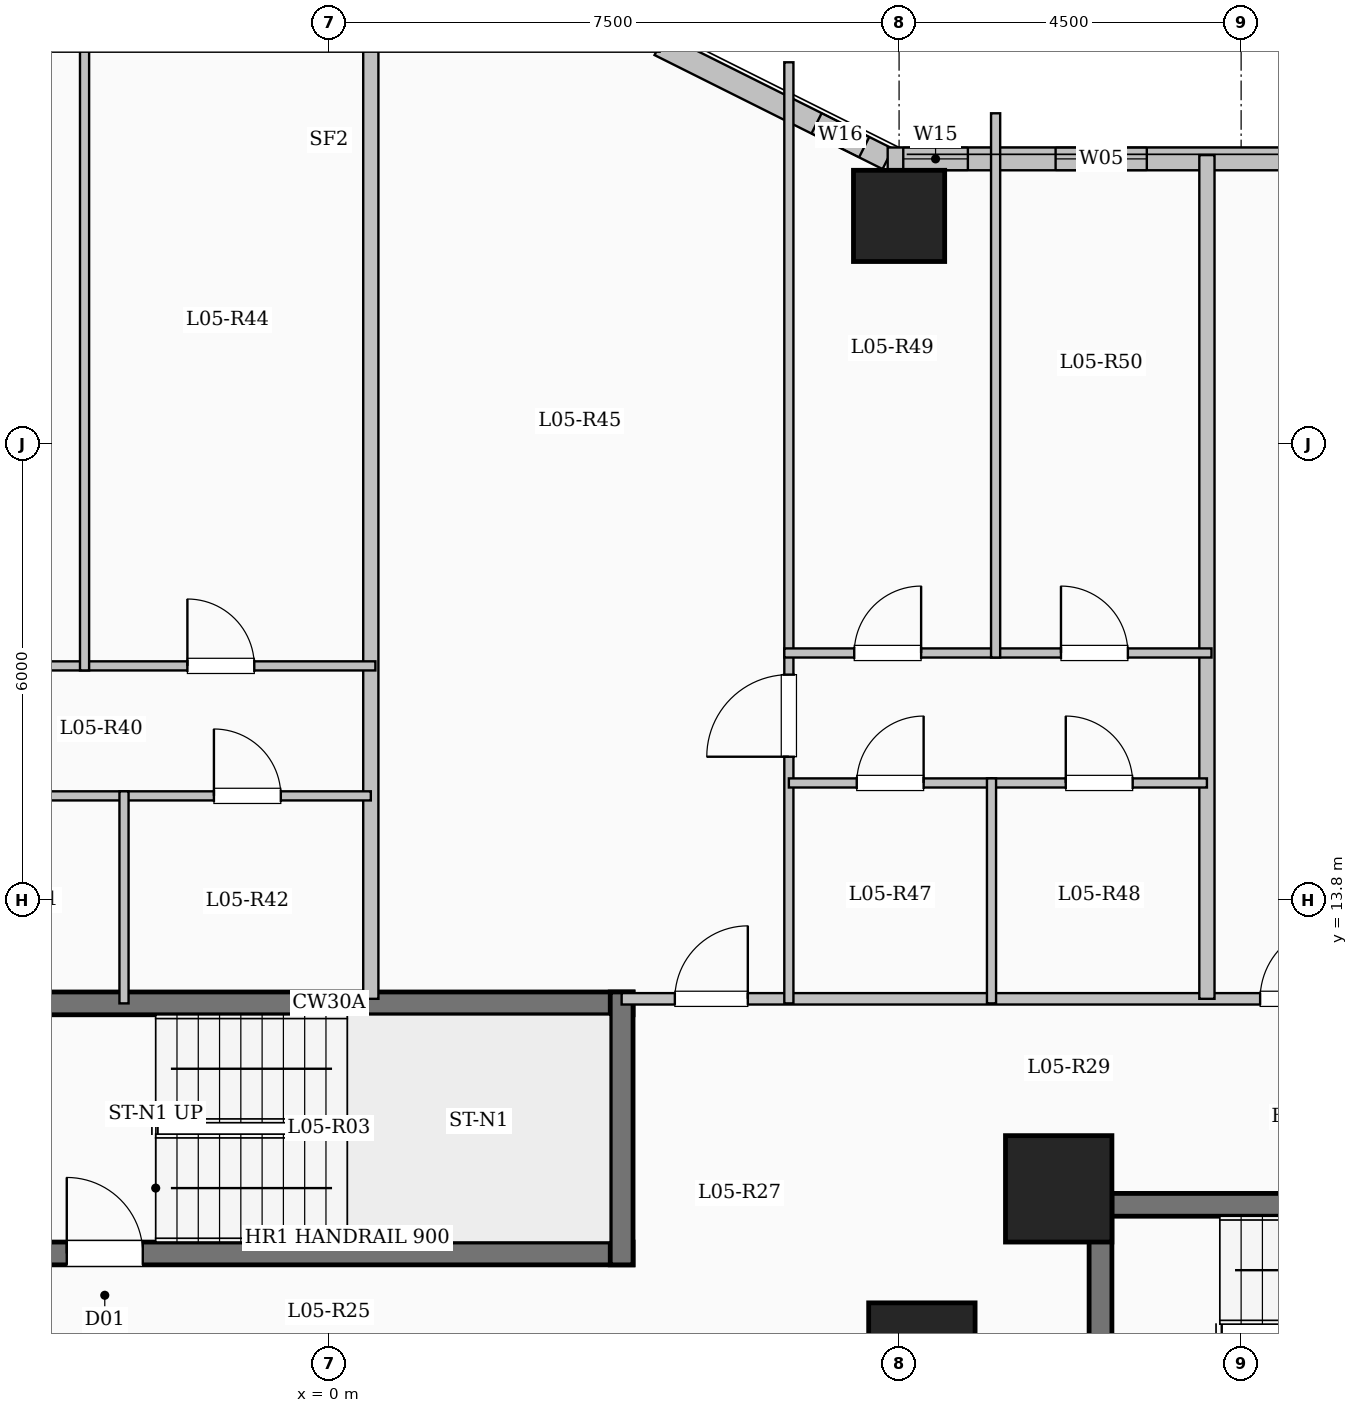
"""IFC4 building model, lengths in metres.
Left out: names, types, materials, properties, quantities, classifications, styles, units other than length and angle.
Written with IfcOpenShell. Run it as: python <this file> out.ifc"""

import sys

from ifc_helpers import new_model, si_unit, direction, frame, frame_2d, origin, origin_2d, place, context, subcontext, project, spatial, rectangle, extrude, element, fill, save


model = new_model("IFC4")
c1 = context("Model", 3, precision=1e-05, world=origin(), true_north=direction((0.0, 1.0)))
c2 = subcontext(c1, "Body", "Model", "MODEL_VIEW")
j1 = project(units=[si_unit("LENGTHUNIT", "METRE"), si_unit("PLANEANGLEUNIT", "RADIAN")], contexts=[c1])
p1 = place(None, origin())
s1 = spatial("IfcSite", under=j1, at=p1, CompositionType="ELEMENT")
p2 = place(p1, origin())
s2 = spatial("IfcBuilding", under=s1, at=p2, CompositionType="ELEMENT")
p3 = place(p2, frame((0.0, 0.0, 24.0)))
s3 = spatial("IfcBuildingStorey", under=s2, at=p3, CompositionType="ELEMENT", Elevation=24.0)
for number, where, z_axis, x_axis in (
    (1, (7.8, 7.8, 0.0), (0.0, 0.0, 1.0), (1.0, 0.0, 0.0)),
    (2, (9.6, 10.0, 0.0), (0.0, 0.0, 1.0), (1.0, 0.0, 0.0)),
):
    element("IfcColumn", number, at=place(p3, frame(where, z_axis=z_axis, x_axis=x_axis)), inside=s3, PredefinedType="COLUMN", context=c2, shape_type="SweptSolid", body=[
        extrude(rectangle(XDim=1.4, YDim=1.4, at=origin_2d()), origin(), (0.0, 0.0, 1.0), 3.35),
    ])
p4 = place(p3, frame((7.5, 22.8, 0.0), z_axis=(0.0, 0.0, 1.0), x_axis=(1.0, 0.0, 0.0)))
e3 = element("IfcColumn", 3, at=p4, inside=s3, PredefinedType="COLUMN", context=c2, shape_type="SweptSolid", body=[
    extrude(rectangle(XDim=1.2, YDim=1.2, at=origin_2d()), origin(), (0.0, 0.0, 1.0), 3.35),
])
p5 = place(p3, frame((4.35, 25.05, 0.0), z_axis=(0.0, 0.0, 1.0), x_axis=(0.894427191, -0.4472135955, 0.0)))
e4 = element("IfcWall", 4, at=p5, inside=s3, PredefinedType="SOLIDWALL", context=c2, shape_type="SweptSolid", body=[
    extrude(rectangle(XDim=3.354, YDim=0.3, at=frame_2d((1.677, 0.0))), origin(), (0.0, 0.0, 1.0), 3.1),
])
p6 = place(p5, frame((2.308, 0.0, 0.95)))
e5 = element("IfcOpeningElement", 5, at=p6, cuts=e4, PredefinedType="OPENING", context=c2, shape_type="SweptSolid", body=[
    extrude(rectangle(XDim=0.7, YDim=1.5, at=frame_2d((0.35, 0.75))), frame((0.0, 0.16, 0.0), z_axis=(0.0, -1.0, 0.0), x_axis=(1.0, 0.0, 0.0)), (0.0, 0.0, 1.0), 0.32),
])
p7 = place(p3, frame((7.35, 23.55, 0.0), z_axis=(0.0, 0.0, 1.0), x_axis=(1.0, 0.0, 0.0)))
e6 = element("IfcWall", 6, at=p7, inside=s3, PredefinedType="SOLIDWALL", context=c2, shape_type="SweptSolid", body=[
    extrude(rectangle(XDim=15.3, YDim=0.3, at=frame_2d((7.65, 0.0))), origin(), (0.0, 0.0, 1.0), 3.1),
])
p8 = place(p7, frame((0.205, 0.0, 0.95)))
e7 = element("IfcOpeningElement", 7, at=p8, cuts=e6, PredefinedType="OPENING", context=c2, shape_type="SweptSolid", body=[
    extrude(rectangle(XDim=0.85, YDim=1.5, at=frame_2d((0.425, 0.75))), frame((0.0, 0.16, 0.0), z_axis=(0.0, -1.0, 0.0), x_axis=(1.0, 0.0, 0.0)), (0.0, 0.0, 1.0), 0.32),
])
p9 = place(p7, frame((2.209, 0.0, 0.95)))
e8 = element("IfcOpeningElement", 8, at=p9, cuts=e6, PredefinedType="OPENING", context=c2, shape_type="SweptSolid", body=[
    extrude(rectangle(XDim=1.2, YDim=1.5, at=frame_2d((0.6, 0.75))), frame((0.0, 0.16, 0.0), z_axis=(0.0, -1.0, 0.0), x_axis=(1.0, 0.0, 0.0)), (0.0, 0.0, 1.0), 0.32),
])
p10 = place(p7, frame((5.196, 0.0, 0.9)))
e9 = element("IfcOpeningElement", 9, at=p10, cuts=e6, PredefinedType="OPENING", context=c2, shape_type="SweptSolid", body=[
    extrude(rectangle(XDim=2.4, YDim=1.8, at=frame_2d((1.2, 0.9))), frame((0.0, 0.16, 0.0), z_axis=(0.0, -1.0, 0.0), x_axis=(1.0, 0.0, 0.0)), (0.0, 0.0, 1.0), 0.32),
])
p11 = place(p7, frame((9.483, 0.0, 0.9)))
e10 = element("IfcOpeningElement", 10, at=p11, cuts=e6, PredefinedType="OPENING", context=c2, shape_type="SweptSolid", body=[
    extrude(rectangle(XDim=1.5, YDim=1.65, at=frame_2d((0.75, 0.825))), frame((0.0, 0.16, 0.0), z_axis=(0.0, -1.0, 0.0), x_axis=(1.0, 0.0, 0.0)), (0.0, 0.0, 1.0), 0.32),
])
p12 = place(p7, frame((12.644, 0.0, 0.9)))
e11 = element("IfcOpeningElement", 11, at=p12, cuts=e6, PredefinedType="OPENING", context=c2, shape_type="SweptSolid", body=[
    extrude(rectangle(XDim=1.8, YDim=1.65, at=frame_2d((0.9, 0.825))), frame((0.0, 0.16, 0.0), z_axis=(0.0, -1.0, 0.0), x_axis=(1.0, 0.0, 0.0)), (0.0, 0.0, 1.0), 0.32),
])
p13 = place(p3, frame((10.0, 9.79, 0.0), z_axis=(0.0, 0.0, 1.0), x_axis=(1.0, 0.0, 0.0)))
e12 = element("IfcWall", 12, at=p13, inside=s3, PredefinedType="SHEAR", context=c2, shape_type="SweptSolid", body=[
    extrude(rectangle(XDim=8.0, YDim=0.3, at=frame_2d((4.0, 0.0))), origin(), (0.0, 0.0, 1.0), 3.35),
])
p14 = place(p3, frame((10.15, 6.35, 0.0), z_axis=(0.0, 0.0, 1.0), x_axis=(0.0, 1.0, 0.0)))
e13 = element("IfcWall", 13, at=p14, inside=s3, PredefinedType="SHEAR", context=c2, shape_type="SweptSolid", body=[
    extrude(rectangle(XDim=3.59, YDim=0.3, at=frame_2d((1.795, 0.0))), origin(), (0.0, 0.0, 1.0), 3.35),
])
p15 = place(p3, frame((-4.0, 12.44, 0.0), z_axis=(0.0, 0.0, 1.0), x_axis=(1.0, 0.0, 0.0)))
e14 = element("IfcWall", 14, at=p15, inside=s3, PredefinedType="SHEAR", context=c2, shape_type="SweptSolid", body=[
    extrude(rectangle(XDim=8.0, YDim=0.3, at=frame_2d((4.0, 0.0))), origin(), (0.0, 0.0, 1.0), 3.35),
])
p16 = place(p3, frame((-4.0, 9.15, 0.0), z_axis=(0.0, 0.0, 1.0), x_axis=(1.0, 0.0, 0.0)))
e15 = element("IfcWall", 15, at=p16, inside=s3, PredefinedType="SHEAR", context=c2, shape_type="SweptSolid", body=[
    extrude(rectangle(XDim=8.0, YDim=0.3, at=frame_2d((4.0, 0.0))), origin(), (0.0, 0.0, 1.0), 3.35),
])
p17 = place(p16, frame((0.55, 0.0, 0.0)))
e16 = element("IfcOpeningElement", 16, at=p17, cuts=e15, PredefinedType="OPENING", context=c2, shape_type="SweptSolid", body=[
    extrude(rectangle(XDim=1.0, YDim=2.15, at=frame_2d((0.5, 1.075))), frame((0.0, 0.16, 0.0), z_axis=(0.0, -1.0, 0.0), x_axis=(1.0, 0.0, 0.0)), (0.0, 0.0, 1.0), 0.32),
])
p18 = place(p3, frame((3.85, 9.0, 0.0), z_axis=(0.0, 0.0, 1.0), x_axis=(0.0, 1.0, 0.0)))
e17 = element("IfcWall", 17, at=p18, inside=s3, PredefinedType="SHEAR", context=c2, shape_type="SweptSolid", body=[
    extrude(rectangle(XDim=3.59, YDim=0.3, at=frame_2d((1.795, 0.0))), origin(), (0.0, 0.0, 1.0), 3.35),
])
p19 = place(p3, frame((3.85, 12.5, 0.0), z_axis=(0.0, 0.0, 1.0), x_axis=(1.0, 0.0, 0.0)))
e18 = element("IfcWall", 18, at=p19, inside=s3, PredefinedType="PARTITIONING", context=c2, shape_type="SweptSolid", body=[
    extrude(rectangle(XDim=18.7, YDim=0.15, at=frame_2d((9.35, 0.0))), origin(), (0.0, 0.0, 1.0), 3.1),
])
p20 = place(p19, frame((0.7, 0.0, 0.0)))
e19 = element("IfcOpeningElement", 19, at=p20, cuts=e18, PredefinedType="OPENING", context=c2, shape_type="SweptSolid", body=[
    extrude(rectangle(XDim=0.96, YDim=2.15, at=frame_2d((0.48, 1.075))), frame((0.0, 0.085, 0.0), z_axis=(0.0, -1.0, 0.0), x_axis=(1.0, 0.0, 0.0)), (0.0, 0.0, 1.0), 0.17),
])
p21 = place(p19, frame((8.4, 0.0, 0.0)))
e20 = element("IfcOpeningElement", 20, at=p21, cuts=e18, PredefinedType="OPENING", context=c2, shape_type="SweptSolid", body=[
    extrude(rectangle(XDim=0.96, YDim=2.15, at=frame_2d((0.48, 1.075))), frame((0.0, 0.085, 0.0), z_axis=(0.0, -1.0, 0.0), x_axis=(1.0, 0.0, 0.0)), (0.0, 0.0, 1.0), 0.17),
])
p22 = place(p3, frame((0.55, 12.5, 0.0), z_axis=(0.0, 0.0, 1.0), x_axis=(0.0, 1.0, 0.0)))
e21 = element("IfcWall", 21, at=p22, inside=s3, PredefinedType="SOLIDWALL", context=c2, shape_type="SweptSolid", body=[
    extrude(rectangle(XDim=12.58, YDim=0.2, at=frame_2d((6.29, 0.0))), origin(), (0.0, 0.0, 1.0), 3.1),
])
p23 = place(p3, frame((-6.922, 15.17, 0.0), z_axis=(0.0, 0.0, 1.0), x_axis=(1.0, 0.0, 0.0)))
e22 = element("IfcWall", 22, at=p23, inside=s3, PredefinedType="PARTITIONING", context=c2, shape_type="SweptSolid", body=[
    extrude(rectangle(XDim=4.225, YDim=0.12, at=frame_2d((2.113, 0.0))), origin(), (0.0, 0.0, 1.0), 3.1),
])
p24 = place(p23, frame((1.672, 0.0, 0.0)))
e23 = element("IfcOpeningElement", 23, at=p24, cuts=e22, PredefinedType="OPENING", context=c2, shape_type="SweptSolid", body=[
    extrude(rectangle(XDim=0.88, YDim=2.1, at=frame_2d((0.44, 1.05))), frame((0.0, 0.07, 0.0), z_axis=(0.0, -1.0, 0.0), x_axis=(1.0, 0.0, 0.0)), (0.0, 0.0, 1.0), 0.14),
])
p25 = place(p3, frame((-2.697, 15.17, 0.0), z_axis=(0.0, 0.0, 1.0), x_axis=(1.0, 0.0, 0.0)))
e24 = element("IfcWall", 24, at=p25, inside=s3, PredefinedType="PARTITIONING", context=c2, shape_type="SweptSolid", body=[
    extrude(rectangle(XDim=3.247, YDim=0.12, at=frame_2d((1.624, 0.0))), origin(), (0.0, 0.0, 1.0), 3.1),
])
p26 = place(p25, frame((1.183, 0.0, 0.0)))
e25 = element("IfcOpeningElement", 25, at=p26, cuts=e24, PredefinedType="OPENING", context=c2, shape_type="SweptSolid", body=[
    extrude(rectangle(XDim=0.88, YDim=2.1, at=frame_2d((0.44, 1.05))), frame((0.0, 0.07, 0.0), z_axis=(0.0, -1.0, 0.0), x_axis=(1.0, 0.0, 0.0)), (0.0, 0.0, 1.0), 0.14),
])
p27 = place(p3, frame((-6.982, 16.88, 0.0), z_axis=(0.0, 0.0, 1.0), x_axis=(1.0, 0.0, 0.0)))
e26 = element("IfcWall", 26, at=p27, inside=s3, PredefinedType="PARTITIONING", context=c2, shape_type="SweptSolid", body=[
    extrude(rectangle(XDim=7.592, YDim=0.12, at=frame_2d((3.796, 0.0))), origin(), (0.0, 0.0, 1.0), 3.1),
])
p28 = place(p27, frame((1.413, 0.0, 0.0)))
e27 = element("IfcOpeningElement", 27, at=p28, cuts=e26, PredefinedType="OPENING", context=c2, shape_type="SweptSolid", body=[
    extrude(rectangle(XDim=0.88, YDim=2.1, at=frame_2d((0.44, 1.05))), frame((0.0, 0.07, 0.0), z_axis=(0.0, -1.0, 0.0), x_axis=(1.0, 0.0, 0.0)), (0.0, 0.0, 1.0), 0.14),
])
p29 = place(p27, frame((5.119, 0.0, 0.0)))
e28 = element("IfcOpeningElement", 28, at=p29, cuts=e26, PredefinedType="OPENING", context=c2, shape_type="SweptSolid", body=[
    extrude(rectangle(XDim=0.88, YDim=2.1, at=frame_2d((0.44, 1.05))), frame((0.0, 0.07, 0.0), z_axis=(0.0, -1.0, 0.0), x_axis=(1.0, 0.0, 0.0)), (0.0, 0.0, 1.0), 0.14),
])
p30 = place(p3, frame((-2.697, 12.44, 0.0), z_axis=(0.0, 0.0, 1.0), x_axis=(0.0, 1.0, 0.0)))
e29 = element("IfcWall", 29, at=p30, inside=s3, PredefinedType="PARTITIONING", context=c2, shape_type="SweptSolid", body=[
    extrude(rectangle(XDim=2.79, YDim=0.12, at=frame_2d((1.395, 0.0))), origin(), (0.0, 0.0, 1.0), 3.1),
])
p31 = place(p3, frame((-3.216, 16.82, 0.0), z_axis=(0.0, 0.0, 1.0), x_axis=(0.0, 1.0, 0.0)))
e30 = element("IfcWall", 30, at=p31, inside=s3, PredefinedType="PARTITIONING", context=c2, shape_type="SweptSolid", body=[
    extrude(rectangle(XDim=8.26, YDim=0.12, at=frame_2d((4.13, 0.0))), origin(), (0.0, 0.0, 1.0), 3.1),
])
p32 = place(p3, frame((11.55, 12.5, 0.0), z_axis=(0.0, 0.0, 1.0), x_axis=(0.0, 1.0, 0.0)))
e31 = element("IfcWall", 31, at=p32, inside=s3, PredefinedType="SOLIDWALL", context=c2, shape_type="SweptSolid", body=[
    extrude(rectangle(XDim=11.1, YDim=0.2, at=frame_2d((5.55, 0.0))), origin(), (0.0, 0.0, 1.0), 3.1),
])
p33 = place(p3, frame((6.05, 12.44, 0.0), z_axis=(0.0, 0.0, 1.0), x_axis=(0.0, 1.0, 0.0)))
e32 = element("IfcWall", 32, at=p33, inside=s3, PredefinedType="PARTITIONING", context=c2, shape_type="SweptSolid", body=[
    extrude(rectangle(XDim=12.381, YDim=0.12, at=frame_2d((6.19, 0.0))), origin(), (0.0, 0.0, 1.0), 3.1),
])
p34 = place(p33, frame((3.245, 0.0, 0.0)))
e33 = element("IfcOpeningElement", 33, at=p34, cuts=e32, PredefinedType="OPENING", context=c2, shape_type="SweptSolid", body=[
    extrude(rectangle(XDim=1.08, YDim=2.15, at=frame_2d((0.54, 1.075))), frame((0.0, 0.07, 0.0), z_axis=(0.0, -1.0, 0.0), x_axis=(1.0, 0.0, 0.0)), (0.0, 0.0, 1.0), 0.14),
])
p35 = place(p3, frame((6.05, 15.34, 0.0), z_axis=(0.0, 0.0, 1.0), x_axis=(1.0, 0.0, 0.0)))
e34 = element("IfcWall", 34, at=p35, inside=s3, PredefinedType="PARTITIONING", context=c2, shape_type="SweptSolid", body=[
    extrude(rectangle(XDim=2.666, YDim=0.12, at=frame_2d((1.333, 0.0))), origin(), (0.0, 0.0, 1.0), 3.1),
])
p36 = place(p35, frame((0.893, 0.0, 0.0)))
e35 = element("IfcOpeningElement", 35, at=p36, cuts=e34, PredefinedType="OPENING", context=c2, shape_type="SweptSolid", body=[
    extrude(rectangle(XDim=0.88, YDim=2.1, at=frame_2d((0.44, 1.05))), frame((0.0, 0.07, 0.0), z_axis=(0.0, -1.0, 0.0), x_axis=(1.0, 0.0, 0.0)), (0.0, 0.0, 1.0), 0.14),
])
p37 = place(p3, frame((8.716, 15.34, 0.0), z_axis=(0.0, 0.0, 1.0), x_axis=(1.0, 0.0, 0.0)))
e36 = element("IfcWall", 36, at=p37, inside=s3, PredefinedType="PARTITIONING", context=c2, shape_type="SweptSolid", body=[
    extrude(rectangle(XDim=2.834, YDim=0.12, at=frame_2d((1.417, 0.0))), origin(), (0.0, 0.0, 1.0), 3.1),
])
p38 = place(p37, frame((0.977, 0.0, 0.0)))
e37 = element("IfcOpeningElement", 37, at=p38, cuts=e36, PredefinedType="OPENING", context=c2, shape_type="SweptSolid", body=[
    extrude(rectangle(XDim=0.88, YDim=2.1, at=frame_2d((0.44, 1.05))), frame((0.0, 0.07, 0.0), z_axis=(0.0, -1.0, 0.0), x_axis=(1.0, 0.0, 0.0)), (0.0, 0.0, 1.0), 0.14),
])
p39 = place(p3, frame((5.99, 17.05, 0.0), z_axis=(0.0, 0.0, 1.0), x_axis=(1.0, 0.0, 0.0)))
e38 = element("IfcWall", 38, at=p39, inside=s3, PredefinedType="PARTITIONING", context=c2, shape_type="SweptSolid", body=[
    extrude(rectangle(XDim=5.62, YDim=0.12, at=frame_2d((2.81, 0.0))), origin(), (0.0, 0.0, 1.0), 3.1),
])
p40 = place(p39, frame((0.92, 0.0, 0.0)))
e39 = element("IfcOpeningElement", 39, at=p40, cuts=e38, PredefinedType="OPENING", context=c2, shape_type="SweptSolid", body=[
    extrude(rectangle(XDim=0.88, YDim=2.1, at=frame_2d((0.44, 1.05))), frame((0.0, 0.07, 0.0), z_axis=(0.0, -1.0, 0.0), x_axis=(1.0, 0.0, 0.0)), (0.0, 0.0, 1.0), 0.14),
])
p41 = place(p39, frame((3.64, 0.0, 0.0)))
e40 = element("IfcOpeningElement", 40, at=p41, cuts=e38, PredefinedType="OPENING", context=c2, shape_type="SweptSolid", body=[
    extrude(rectangle(XDim=0.88, YDim=2.1, at=frame_2d((0.44, 1.05))), frame((0.0, 0.07, 0.0), z_axis=(0.0, -1.0, 0.0), x_axis=(1.0, 0.0, 0.0)), (0.0, 0.0, 1.0), 0.14),
])
p42 = place(p3, frame((8.716, 12.44, 0.0), z_axis=(0.0, 0.0, 1.0), x_axis=(0.0, 1.0, 0.0)))
e41 = element("IfcWall", 41, at=p42, inside=s3, PredefinedType="PARTITIONING", context=c2, shape_type="SweptSolid", body=[
    extrude(rectangle(XDim=2.96, YDim=0.12, at=frame_2d((1.48, 0.0))), origin(), (0.0, 0.0, 1.0), 3.1),
])
p43 = place(p3, frame((8.77, 16.99, 0.0), z_axis=(0.0, 0.0, 1.0), x_axis=(0.0, 1.0, 0.0)))
e42 = element("IfcWall", 42, at=p43, inside=s3, PredefinedType="PARTITIONING", context=c2, shape_type="SweptSolid", body=[
    extrude(rectangle(XDim=7.16, YDim=0.12, at=frame_2d((3.58, 0.0))), origin(), (0.0, 0.0, 1.0), 3.1),
])
p44 = place(p6, origin())
e43 = element("IfcWindow", 43, at=p44, inside=s3, PartitioningType="SINGLE_PANEL", PredefinedType="WINDOW", context=c2, shape_type="SweptSolid", body=[
    extrude(rectangle(XDim=0.7, YDim=1.5, at=frame_2d((0.35, 0.75))), frame((0.0, 0.03, 0.0), z_axis=(0.0, -1.0, 0.0), x_axis=(1.0, 0.0, 0.0)), (0.0, 0.0, 1.0), 0.06),
])
fill(e5, e43)
p45 = place(p8, origin())
e44 = element("IfcWindow", 44, at=p45, inside=s3, PartitioningType="SINGLE_PANEL", PredefinedType="WINDOW", context=c2, shape_type="SweptSolid", body=[
    extrude(rectangle(XDim=0.85, YDim=1.5, at=frame_2d((0.425, 0.75))), frame((0.0, 0.03, 0.0), z_axis=(0.0, -1.0, 0.0), x_axis=(1.0, 0.0, 0.0)), (0.0, 0.0, 1.0), 0.06),
])
fill(e7, e44)
p46 = place(p9, origin())
e45 = element("IfcWindow", 45, at=p46, inside=s3, PartitioningType="SINGLE_PANEL", PredefinedType="WINDOW", context=c2, shape_type="SweptSolid", body=[
    extrude(rectangle(XDim=1.2, YDim=1.5, at=frame_2d((0.6, 0.75))), frame((0.0, 0.03, 0.0), z_axis=(0.0, -1.0, 0.0), x_axis=(1.0, 0.0, 0.0)), (0.0, 0.0, 1.0), 0.06),
])
fill(e8, e45)
p47 = place(p17, origin())
e46 = element("IfcDoor", 46, at=p47, inside=s3, OperationType="SINGLE_SWING_LEFT", PredefinedType="DOOR", context=c2, shape_type="SweptSolid", body=[
    extrude(rectangle(XDim=1.0, YDim=2.15, at=frame_2d((0.5, 1.075))), frame((0.0, 0.025, 0.0), z_axis=(0.0, -1.0, 0.0), x_axis=(1.0, 0.0, 0.0)), (0.0, 0.0, 1.0), 0.05),
])
fill(e16, e46)
p48 = place(p26, origin())
e47 = element("IfcDoor", 47, at=p48, inside=s3, OperationType="SINGLE_SWING_LEFT", PredefinedType="DOOR", context=c2, shape_type="SweptSolid", body=[
    extrude(rectangle(XDim=0.88, YDim=2.1, at=frame_2d((0.44, 1.05))), frame((0.0, 0.025, 0.0), z_axis=(0.0, -1.0, 0.0), x_axis=(1.0, 0.0, 0.0)), (0.0, 0.0, 1.0), 0.05),
])
fill(e25, e47)
p49 = place(p29, origin())
e48 = element("IfcDoor", 48, at=p49, inside=s3, OperationType="SINGLE_SWING_LEFT", PredefinedType="DOOR", context=c2, shape_type="SweptSolid", body=[
    extrude(rectangle(XDim=0.88, YDim=2.1, at=frame_2d((0.44, 1.05))), frame((0.0, 0.025, 0.0), z_axis=(0.0, -1.0, 0.0), x_axis=(1.0, 0.0, 0.0)), (0.0, 0.0, 1.0), 0.05),
])
fill(e28, e48)
p50 = place(p20, origin())
e49 = element("IfcDoor", 49, at=p50, inside=s3, OperationType="SINGLE_SWING_RIGHT", PredefinedType="DOOR", context=c2, shape_type="SweptSolid", body=[
    extrude(rectangle(XDim=0.96, YDim=2.15, at=frame_2d((0.48, 1.075))), frame((0.0, 0.025, 0.0), z_axis=(0.0, -1.0, 0.0), x_axis=(1.0, 0.0, 0.0)), (0.0, 0.0, 1.0), 0.05),
])
fill(e19, e49)
p51 = place(p34, origin())
e50 = element("IfcDoor", 50, at=p51, inside=s3, OperationType="SINGLE_SWING_LEFT", PredefinedType="DOOR", context=c2, shape_type="SweptSolid", body=[
    extrude(rectangle(XDim=1.08, YDim=2.15, at=frame_2d((0.54, 1.075))), frame((0.0, 0.025, 0.0), z_axis=(0.0, -1.0, 0.0), x_axis=(1.0, 0.0, 0.0)), (0.0, 0.0, 1.0), 0.05),
])
fill(e33, e50)
p52 = place(p36, origin())
e51 = element("IfcDoor", 51, at=p52, inside=s3, OperationType="SINGLE_SWING_RIGHT", PredefinedType="DOOR", context=c2, shape_type="SweptSolid", body=[
    extrude(rectangle(XDim=0.88, YDim=2.1, at=frame_2d((0.44, 1.05))), frame((0.0, 0.025, 0.0), z_axis=(0.0, -1.0, 0.0), x_axis=(1.0, 0.0, 0.0)), (0.0, 0.0, 1.0), 0.05),
])
fill(e35, e51)
p53 = place(p38, origin())
e52 = element("IfcDoor", 52, at=p53, inside=s3, OperationType="SINGLE_SWING_LEFT", PredefinedType="DOOR", context=c2, shape_type="SweptSolid", body=[
    extrude(rectangle(XDim=0.88, YDim=2.1, at=frame_2d((0.44, 1.05))), frame((0.0, 0.025, 0.0), z_axis=(0.0, -1.0, 0.0), x_axis=(1.0, 0.0, 0.0)), (0.0, 0.0, 1.0), 0.05),
])
fill(e37, e52)
p54 = place(p40, origin())
e53 = element("IfcDoor", 53, at=p54, inside=s3, OperationType="SINGLE_SWING_RIGHT", PredefinedType="DOOR", context=c2, shape_type="SweptSolid", body=[
    extrude(rectangle(XDim=0.88, YDim=2.1, at=frame_2d((0.44, 1.05))), frame((0.0, 0.025, 0.0), z_axis=(0.0, -1.0, 0.0), x_axis=(1.0, 0.0, 0.0)), (0.0, 0.0, 1.0), 0.05),
])
fill(e39, e53)
p55 = place(p41, origin())
e54 = element("IfcDoor", 54, at=p55, inside=s3, OperationType="SINGLE_SWING_LEFT", PredefinedType="DOOR", context=c2, shape_type="SweptSolid", body=[
    extrude(rectangle(XDim=0.88, YDim=2.1, at=frame_2d((0.44, 1.05))), frame((0.0, 0.025, 0.0), z_axis=(0.0, -1.0, 0.0), x_axis=(1.0, 0.0, 0.0)), (0.0, 0.0, 1.0), 0.05),
])
fill(e40, e54)
p56 = place(p21, origin())
e55 = element("IfcDoor", 55, at=p56, inside=s3, OperationType="SINGLE_SWING_RIGHT", PredefinedType="DOOR", context=c2, shape_type="SweptSolid", body=[
    extrude(rectangle(XDim=0.96, YDim=2.15, at=frame_2d((0.48, 1.075))), frame((0.0, 0.025, 0.0), z_axis=(0.0, -1.0, 0.0), x_axis=(1.0, 0.0, 0.0)), (0.0, 0.0, 1.0), 0.05),
])
fill(e20, e55)
save(model, sys.argv[1])
